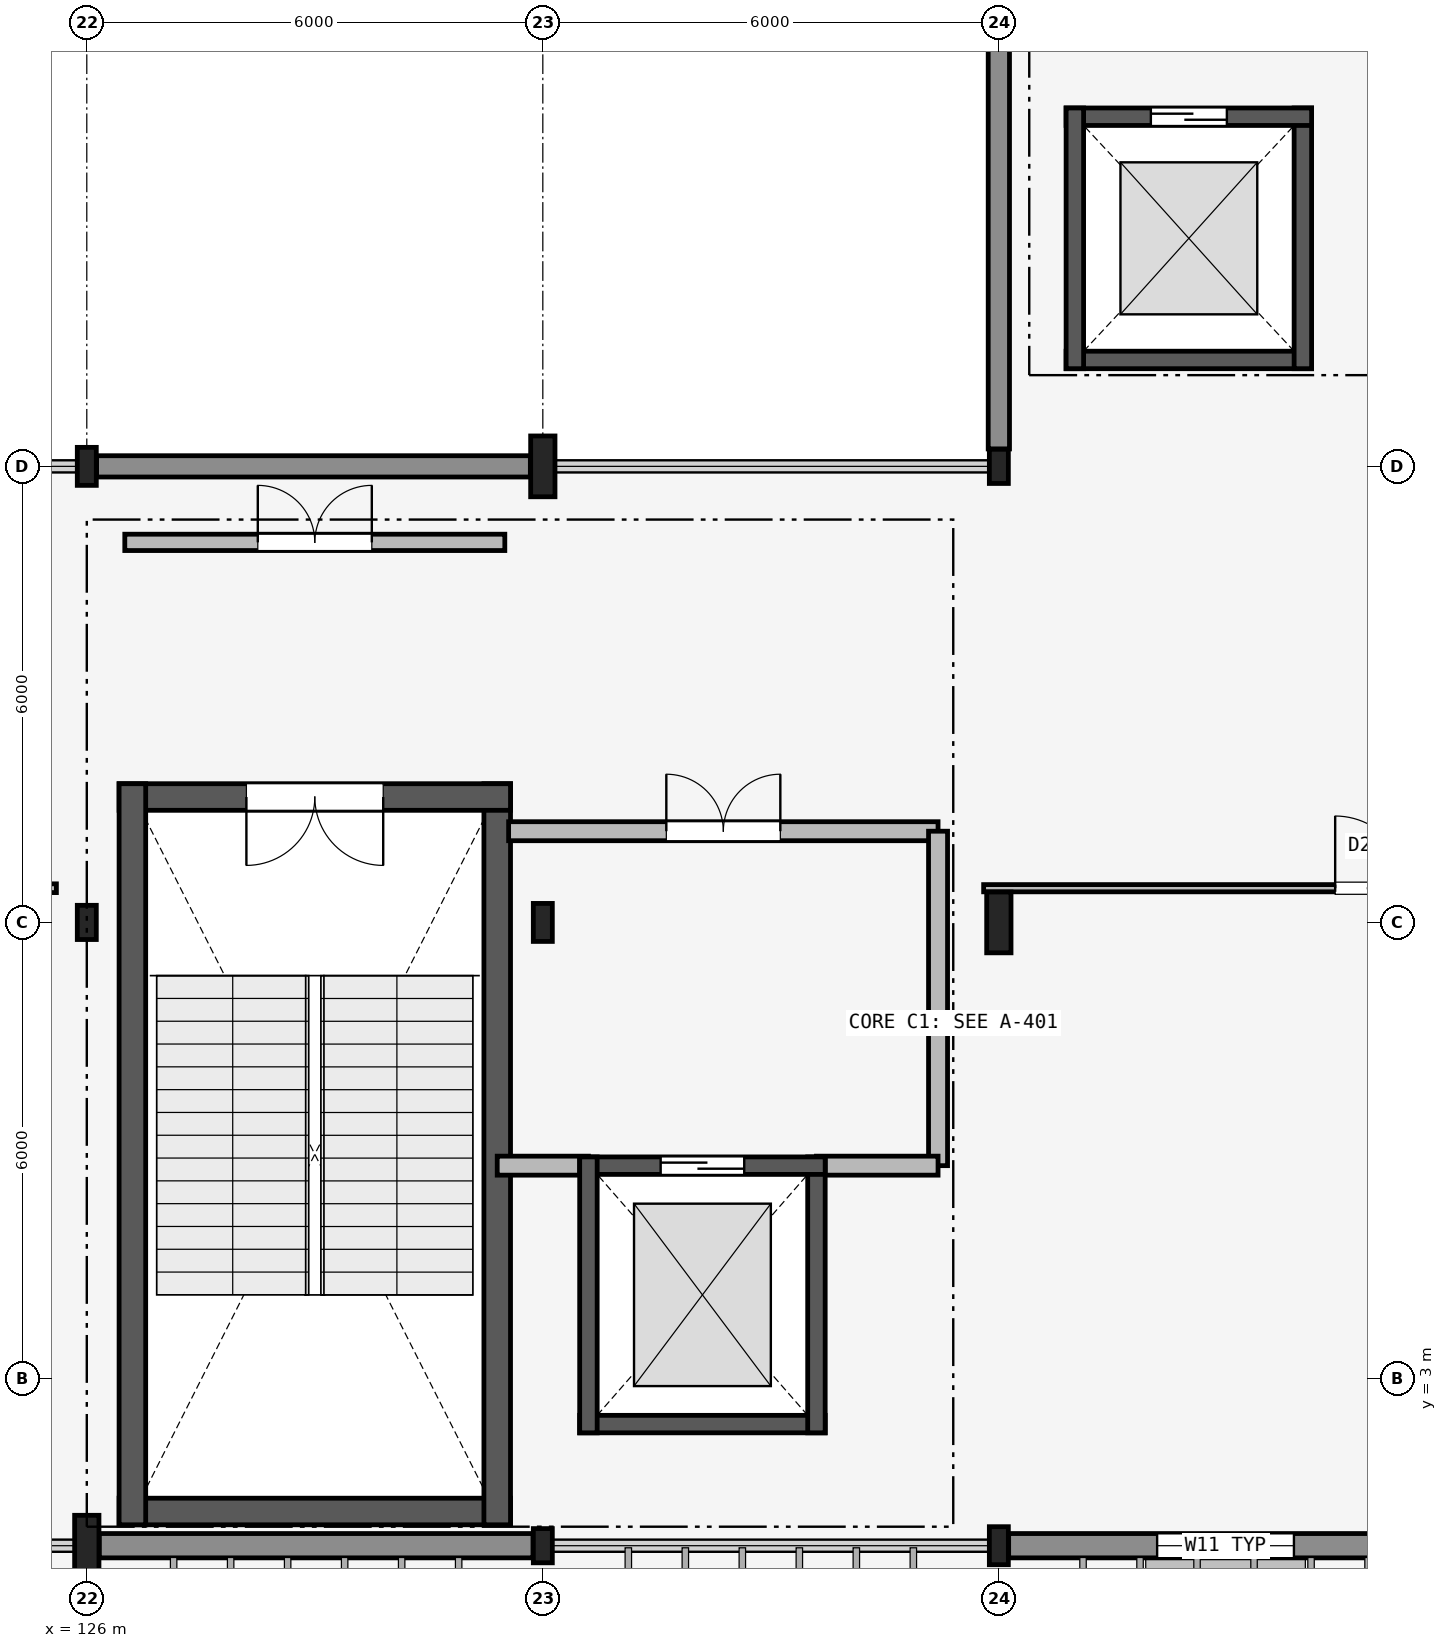
"""IFC4 building model, lengths in metres.
Left out: names, types, materials, properties, quantities, classifications, styles, units other than length and angle.
Written with IfcOpenShell. Run it as: python <this file> out.ifc"""

import sys

from ifc_helpers import new_model, si_unit, direction, frame, frame_2d, origin, origin_2d, place, context, subcontext, project, spatial, rectangle, i_section, extrude, element, fill, save


model = new_model("IFC4")
c1 = context("Model", 3, precision=1e-05, world=origin(), true_north=direction((0.0, 1.0)))
c2 = subcontext(c1, "Body", "Model", "MODEL_VIEW")
j1 = project(units=[si_unit("LENGTHUNIT", "METRE"), si_unit("PLANEANGLEUNIT", "RADIAN")], contexts=[c1])
p1 = place(None, origin())
s1 = spatial("IfcSite", under=j1, at=p1, CompositionType="ELEMENT")
p2 = place(p1, origin())
s2 = spatial("IfcBuilding", under=s1, at=p2, CompositionType="ELEMENT")
p3 = place(p2, frame((0.0, 0.0, 18.0)))
s3 = spatial("IfcBuildingStorey", under=s2, at=p3, CompositionType="ELEMENT", Elevation=18.0)
p4 = place(p3, frame((126.0, 0.8, 0.0), z_axis=(0.0, 0.0, 1.0), x_axis=(1.0, 0.0, 0.0)))
e1 = element("IfcColumn", 1, at=p4, inside=s3, PredefinedType="COLUMN", context=c2, shape_type="SweptSolid", body=[
    extrude(i_section(OverallWidth=0.32, OverallDepth=0.8, WebThickness=0.016, FlangeThickness=0.028, at=origin_2d()), origin(), (0.0, 0.0, 1.0), 4.2),
])
p5 = place(p3, frame((126.0, 9.0, 0.0), z_axis=(0.0, 0.0, 1.0), x_axis=(1.0, 0.0, 0.0)))
e2 = element("IfcColumn", 2, at=p5, inside=s3, PredefinedType="COLUMN", context=c2, shape_type="SweptSolid", body=[
    extrude(i_section(OverallWidth=0.25, OverallDepth=0.45, WebThickness=0.011, FlangeThickness=0.014, FilletRadius=0.015, at=origin_2d()), origin(), (0.0, 0.0, 1.0), 4.2),
])
p6 = place(p3, frame((126.0, 15.0, 0.0), z_axis=(0.0, 0.0, 1.0), x_axis=(1.0, 0.0, 0.0)))
e3 = element("IfcColumn", 3, at=p6, inside=s3, PredefinedType="COLUMN", context=c2, shape_type="SweptSolid", body=[
    extrude(i_section(OverallWidth=0.25, OverallDepth=0.5, WebThickness=0.01, FlangeThickness=0.015, FilletRadius=0.015, at=origin_2d()), origin(), (0.0, 0.0, 1.0), 4.2),
])
p7 = place(p3, frame((132.0, 0.8, 0.0), z_axis=(0.0, 0.0, 1.0), x_axis=(1.0, 0.0, 0.0)))
e4 = element("IfcColumn", 4, at=p7, inside=s3, PredefinedType="COLUMN", context=c2, shape_type="SweptSolid", body=[
    extrude(i_section(OverallWidth=0.25, OverallDepth=0.45, WebThickness=0.011, FlangeThickness=0.014, FilletRadius=0.015, at=origin_2d()), origin(), (0.0, 0.0, 1.0), 4.2),
])
p8 = place(p3, frame((132.0, 9.0, 0.0), z_axis=(0.0, 0.0, 1.0), x_axis=(1.0, 0.0, 0.0)))
e5 = element("IfcColumn", 5, at=p8, inside=s3, PredefinedType="COLUMN", context=c2, shape_type="SweptSolid", body=[
    extrude(i_section(OverallWidth=0.25, OverallDepth=0.5, WebThickness=0.01, FlangeThickness=0.015, FilletRadius=0.015, at=origin_2d()), origin(), (0.0, 0.0, 1.0), 4.2),
])
p9 = place(p3, frame((132.0, 15.0, 0.0), z_axis=(0.0, 0.0, 1.0), x_axis=(1.0, 0.0, 0.0)))
e6 = element("IfcColumn", 6, at=p9, inside=s3, PredefinedType="COLUMN", context=c2, shape_type="SweptSolid", body=[
    extrude(i_section(OverallWidth=0.32, OverallDepth=0.8, WebThickness=0.016, FlangeThickness=0.028, at=origin_2d()), origin(), (0.0, 0.0, 1.0), 4.2),
])
p10 = place(p3, frame((138.0, 0.8, 0.0), z_axis=(0.0, 0.0, 1.0), x_axis=(1.0, 0.0, 0.0)))
e7 = element("IfcColumn", 7, at=p10, inside=s3, PredefinedType="COLUMN", context=c2, shape_type="SweptSolid", body=[
    extrude(i_section(OverallWidth=0.25, OverallDepth=0.5, WebThickness=0.01, FlangeThickness=0.015, FilletRadius=0.015, at=origin_2d()), origin(), (0.0, 0.0, 1.0), 4.2),
])
p11 = place(p3, frame((138.0, 9.0, 0.0), z_axis=(0.0, 0.0, 1.0), x_axis=(1.0, 0.0, 0.0)))
e8 = element("IfcColumn", 8, at=p11, inside=s3, PredefinedType="COLUMN", context=c2, shape_type="SweptSolid", body=[
    extrude(i_section(OverallWidth=0.32, OverallDepth=0.8, WebThickness=0.016, FlangeThickness=0.028, at=origin_2d()), origin(), (0.0, 0.0, 1.0), 4.2),
])
p12 = place(p3, frame((138.0, 15.0, 0.0), z_axis=(0.0, 0.0, 1.0), x_axis=(1.0, 0.0, 0.0)))
e9 = element("IfcColumn", 9, at=p12, inside=s3, PredefinedType="COLUMN", context=c2, shape_type="SweptSolid", body=[
    extrude(i_section(OverallWidth=0.25, OverallDepth=0.45, WebThickness=0.011, FlangeThickness=0.014, FilletRadius=0.015, at=origin_2d()), origin(), (0.0, 0.0, 1.0), 4.2),
])
p13 = place(p3, frame((126.164, 0.8, 0.0), z_axis=(0.0, 0.0, 1.0), x_axis=(1.0, 0.0, 0.0)))
e10 = element("IfcWall", 10, at=p13, inside=s3, PredefinedType="SOLIDWALL", context=c2, shape_type="SweptSolid", body=[
    extrude(rectangle(XDim=5.707, YDim=0.32, at=frame_2d((2.854, 0.0))), origin(), (0.0, 0.0, 1.0), 3.39),
])
p14 = place(p3, frame((138.129, 0.8, 0.0), z_axis=(0.0, 0.0, 1.0), x_axis=(1.0, 0.0, 0.0)))
e11 = element("IfcWall", 11, at=p14, inside=s3, PredefinedType="SOLIDWALL", context=c2, shape_type="SweptSolid", body=[
    extrude(rectangle(XDim=5.707, YDim=0.32, at=frame_2d((2.854, 0.0))), origin(), (0.0, 0.0, 1.0), 3.39),
])
p15 = place(p14, frame((1.954, 0.0, 0.6)))
e12 = element("IfcOpeningElement", 12, at=p15, cuts=e11, PredefinedType="OPENING", context=c2, shape_type="SweptSolid", body=[
    extrude(rectangle(XDim=1.8, YDim=2.2, at=frame_2d((0.9, 1.1))), frame((0.0, 0.17, 0.0), z_axis=(0.0, -1.0, 0.0), x_axis=(1.0, 0.0, 0.0)), (0.0, 0.0, 1.0), 0.34),
])
p16 = place(p3, frame((126.129, 15.0, 0.0), z_axis=(0.0, 0.0, 1.0), x_axis=(1.0, 0.0, 0.0)))
e13 = element("IfcWall", 13, at=p16, inside=s3, PredefinedType="SOLIDWALL", context=c2, shape_type="SweptSolid", body=[
    extrude(rectangle(XDim=5.707, YDim=0.28, at=frame_2d((2.854, 0.0))), origin(), (0.0, 0.0, 1.0), 3.29),
])
p17 = place(p3, frame((138.0, 15.229, 0.0), z_axis=(0.0, 0.0, 1.0), x_axis=(0.0, 1.0, 0.0)))
e14 = element("IfcWall", 14, at=p17, inside=s3, PredefinedType="SOLIDWALL", context=c2, shape_type="SweptSolid", body=[
    extrude(rectangle(XDim=5.517, YDim=0.28, at=frame_2d((2.759, 0.0))), origin(), (0.0, 0.0, 1.0), 3.34),
])
p18 = place(p3, frame((126.425, 1.25, 0.0), z_axis=(0.0, 0.0, 1.0), x_axis=(1.0, 0.0, 0.0)))
e15 = element("IfcWall", 15, at=p18, inside=s3, PredefinedType="SHEAR", context=c2, shape_type="SweptSolid", body=[
    extrude(rectangle(XDim=5.15, YDim=0.35, at=frame_2d((2.575, 0.0))), origin(), (0.0, 0.0, 1.0), 4.06),
])
p19 = place(p3, frame((131.4, 1.075, 0.0), z_axis=(0.0, 0.0, 1.0), x_axis=(0.0, 1.0, 0.0)))
e16 = element("IfcWall", 16, at=p19, inside=s3, PredefinedType="SHEAR", context=c2, shape_type="SweptSolid", body=[
    extrude(rectangle(XDim=9.75, YDim=0.35, at=frame_2d((4.875, 0.0))), origin(), (0.0, 0.0, 1.0), 4.06),
])
p20 = place(p3, frame((131.575, 10.65, 0.0), z_axis=(0.0, 0.0, 1.0), x_axis=(-1.0, 0.0, 0.0)))
e17 = element("IfcWall", 17, at=p20, inside=s3, PredefinedType="SHEAR", context=c2, shape_type="SweptSolid", body=[
    extrude(rectangle(XDim=5.15, YDim=0.35, at=frame_2d((2.575, 0.0))), origin(), (0.0, 0.0, 1.0), 4.06),
])
p21 = place(p20, frame((1.675, 0.0, 0.0)))
e18 = element("IfcOpeningElement", 18, at=p21, cuts=e17, PredefinedType="OPENING", context=c2, shape_type="SweptSolid", body=[
    extrude(rectangle(XDim=1.8, YDim=2.2, at=frame_2d((0.9, 1.1))), frame((0.0, 0.185, 0.0), z_axis=(0.0, -1.0, 0.0), x_axis=(1.0, 0.0, 0.0)), (0.0, 0.0, 1.0), 0.37),
])
p22 = place(p3, frame((126.6, 10.825, 0.0), z_axis=(0.0, 0.0, 1.0), x_axis=(0.0, -1.0, 0.0)))
e19 = element("IfcWall", 19, at=p22, inside=s3, PredefinedType="SHEAR", context=c2, shape_type="SweptSolid", body=[
    extrude(rectangle(XDim=9.75, YDim=0.35, at=frame_2d((4.875, 0.0))), origin(), (0.0, 0.0, 1.0), 4.06),
])
p23 = place(p3, frame((126.5, 14.0, 0.0), z_axis=(0.0, 0.0, 1.0), x_axis=(1.0, 0.0, 0.0)))
e20 = element("IfcWall", 20, at=p23, inside=s3, PredefinedType="PARTITIONING", context=c2, shape_type="SweptSolid", body=[
    extrude(rectangle(XDim=5.0, YDim=0.215, at=frame_2d((2.5, 0.0))), origin(), (0.0, 0.0, 1.0), 3.89),
])
p24 = place(p23, frame((1.75, 0.0, 0.0)))
e21 = element("IfcOpeningElement", 21, at=p24, cuts=e20, PredefinedType="OPENING", context=c2, shape_type="SweptSolid", body=[
    extrude(rectangle(XDim=1.5, YDim=2.15, at=frame_2d((0.75, 1.075))), frame((0.0, 0.117, 0.0), z_axis=(0.0, -1.0, 0.0), x_axis=(1.0, 0.0, 0.0)), (0.0, 0.0, 1.0), 0.235),
])
p25 = place(p3, frame((131.55, 10.2, 0.0), z_axis=(0.0, 0.0, 1.0), x_axis=(1.0, 0.0, 0.0)))
e22 = element("IfcWall", 22, at=p25, inside=s3, PredefinedType="PARTITIONING", context=c2, shape_type="SweptSolid", body=[
    extrude(rectangle(XDim=5.65, YDim=0.25, at=frame_2d((2.825, 0.0))), origin(), (0.0, 0.0, 1.0), 3.44),
])
p26 = place(p25, frame((2.075, 0.0, 0.0)))
e23 = element("IfcOpeningElement", 23, at=p26, cuts=e22, PredefinedType="OPENING", context=c2, shape_type="SweptSolid", body=[
    extrude(rectangle(XDim=1.5, YDim=2.15, at=frame_2d((0.75, 1.075))), frame((0.0, 0.135, 0.0), z_axis=(0.0, -1.0, 0.0), x_axis=(1.0, 0.0, 0.0)), (0.0, 0.0, 1.0), 0.27),
])
p27 = place(p3, frame((137.2, 5.8, 0.0), z_axis=(0.0, 0.0, 1.0), x_axis=(0.0, 1.0, 0.0)))
e24 = element("IfcWall", 24, at=p27, inside=s3, PredefinedType="PARTITIONING", context=c2, shape_type="SweptSolid", body=[
    extrude(rectangle(XDim=4.4, YDim=0.25, at=frame_2d((2.2, 0.0))), origin(), (0.0, 0.0, 1.0), 3.34),
])
p28 = place(p3, frame((135.6, 5.8, 0.0), z_axis=(0.0, 0.0, 1.0), x_axis=(1.0, 0.0, 0.0)))
e25 = element("IfcWall", 25, at=p28, inside=s3, PredefinedType="PARTITIONING", context=c2, shape_type="SweptSolid", body=[
    extrude(rectangle(XDim=1.6, YDim=0.25, at=frame_2d((0.8, 0.0))), origin(), (0.0, 0.0, 1.0), 3.89),
])
p29 = place(p3, frame((131.4, 5.8, 0.0), z_axis=(0.0, 0.0, 1.0), x_axis=(1.0, 0.0, 0.0)))
e26 = element("IfcWall", 26, at=p29, inside=s3, PredefinedType="PARTITIONING", context=c2, shape_type="SweptSolid", body=[
    extrude(rectangle(XDim=1.2, YDim=0.25, at=frame_2d((0.6, 0.0))), origin(), (0.0, 0.0, 1.0), 3.39),
])
p30 = place(p3, frame((132.485, 2.4, 0.0), z_axis=(0.0, 0.0, 1.0), x_axis=(1.0, 0.0, 0.0)))
e27 = element("IfcWall", 27, at=p30, inside=s3, PredefinedType="SHEAR", context=c2, shape_type="SweptSolid", body=[
    extrude(rectangle(XDim=3.23, YDim=0.23, at=frame_2d((1.615, 0.0))), origin(), (0.0, 0.0, 1.0), 4.2),
])
p31 = place(p3, frame((135.6, 2.285, 0.0), z_axis=(0.0, 0.0, 1.0), x_axis=(0.0, 1.0, 0.0)))
e28 = element("IfcWall", 28, at=p31, inside=s3, PredefinedType="SHEAR", context=c2, shape_type="SweptSolid", body=[
    extrude(rectangle(XDim=3.63, YDim=0.23, at=frame_2d((1.815, 0.0))), origin(), (0.0, 0.0, 1.0), 4.2),
])
p32 = place(p3, frame((135.715, 5.8, 0.0), z_axis=(0.0, 0.0, 1.0), x_axis=(-1.0, 0.0, 0.0)))
e29 = element("IfcWall", 29, at=p32, inside=s3, PredefinedType="SHEAR", context=c2, shape_type="SweptSolid", body=[
    extrude(rectangle(XDim=3.23, YDim=0.23, at=frame_2d((1.615, 0.0))), origin(), (0.0, 0.0, 1.0), 4.2),
])
p33 = place(p32, frame((1.065, 0.0, 0.0)))
e30 = element("IfcOpeningElement", 30, at=p33, cuts=e29, PredefinedType="OPENING", context=c2, shape_type="SweptSolid", body=[
    extrude(rectangle(XDim=1.1, YDim=2.2, at=frame_2d((0.55, 1.1))), frame((0.0, 0.125, 0.0), z_axis=(0.0, -1.0, 0.0), x_axis=(1.0, 0.0, 0.0)), (0.0, 0.0, 1.0), 0.25),
])
p34 = place(p3, frame((132.6, 5.915, 0.0), z_axis=(0.0, 0.0, 1.0), x_axis=(0.0, -1.0, 0.0)))
e31 = element("IfcWall", 31, at=p34, inside=s3, PredefinedType="SHEAR", context=c2, shape_type="SweptSolid", body=[
    extrude(rectangle(XDim=3.63, YDim=0.23, at=frame_2d((1.815, 0.0))), origin(), (0.0, 0.0, 1.0), 4.2),
])
p35 = place(p3, frame((138.885, 16.4, 0.0), z_axis=(0.0, 0.0, 1.0), x_axis=(1.0, 0.0, 0.0)))
e32 = element("IfcWall", 32, at=p35, inside=s3, PredefinedType="SHEAR", context=c2, shape_type="SweptSolid", body=[
    extrude(rectangle(XDim=3.23, YDim=0.23, at=frame_2d((1.615, 0.0))), origin(), (0.0, 0.0, 1.0), 4.2),
])
p36 = place(p3, frame((142.0, 16.285, 0.0), z_axis=(0.0, 0.0, 1.0), x_axis=(0.0, 1.0, 0.0)))
e33 = element("IfcWall", 33, at=p36, inside=s3, PredefinedType="SHEAR", context=c2, shape_type="SweptSolid", body=[
    extrude(rectangle(XDim=3.43, YDim=0.23, at=frame_2d((1.715, 0.0))), origin(), (0.0, 0.0, 1.0), 4.2),
])
p37 = place(p3, frame((142.115, 19.6, 0.0), z_axis=(0.0, 0.0, 1.0), x_axis=(-1.0, 0.0, 0.0)))
e34 = element("IfcWall", 34, at=p37, inside=s3, PredefinedType="SHEAR", context=c2, shape_type="SweptSolid", body=[
    extrude(rectangle(XDim=3.23, YDim=0.23, at=frame_2d((1.615, 0.0))), origin(), (0.0, 0.0, 1.0), 4.2),
])
p38 = place(p37, frame((1.115, 0.0, 0.0)))
e35 = element("IfcOpeningElement", 35, at=p38, cuts=e34, PredefinedType="OPENING", context=c2, shape_type="SweptSolid", body=[
    extrude(rectangle(XDim=1.0, YDim=2.15, at=frame_2d((0.5, 1.075))), frame((0.0, 0.125, 0.0), z_axis=(0.0, -1.0, 0.0), x_axis=(1.0, 0.0, 0.0)), (0.0, 0.0, 1.0), 0.25),
])
p39 = place(p3, frame((139.0, 19.715, 0.0), z_axis=(0.0, 0.0, 1.0), x_axis=(0.0, -1.0, 0.0)))
e36 = element("IfcWall", 36, at=p39, inside=s3, PredefinedType="SHEAR", context=c2, shape_type="SweptSolid", body=[
    extrude(rectangle(XDim=3.43, YDim=0.23, at=frame_2d((1.715, 0.0))), origin(), (0.0, 0.0, 1.0), 4.2),
])
p40 = place(p3, frame((108.5, 9.45, 0.0), z_axis=(0.0, 0.0, 1.0), x_axis=(1.0, 0.0, 0.0)))
e37 = element("IfcWall", 37, at=p40, inside=s3, PredefinedType="PARTITIONING", context=c2, shape_type="SweptSolid", body=[
    extrude(rectangle(XDim=17.1, YDim=0.115, at=frame_2d((8.55, 0.0))), origin(), (0.0, 0.0, 1.0), 3.44),
])
p41 = place(p40, frame((8.05, 0.0, 0.0)))
e38 = element("IfcOpeningElement", 38, at=p41, cuts=e37, PredefinedType="OPENING", context=c2, shape_type="SweptSolid", body=[
    extrude(rectangle(XDim=1.0, YDim=2.15, at=frame_2d((0.5, 1.075))), frame((0.0, 0.067, 0.0), z_axis=(0.0, -1.0, 0.0), x_axis=(1.0, 0.0, 0.0)), (0.0, 0.0, 1.0), 0.135),
])
p42 = place(p3, frame((137.8, 9.45, 0.0), z_axis=(0.0, 0.0, 1.0), x_axis=(1.0, 0.0, 0.0)))
e39 = element("IfcWall", 39, at=p42, inside=s3, PredefinedType="PARTITIONING", context=c2, shape_type="SweptSolid", body=[
    extrude(rectangle(XDim=12.0, YDim=0.095, at=frame_2d((6.0, 0.0))), origin(), (0.0, 0.0, 1.0), 3.44),
])
p43 = place(p42, frame((4.625, 0.0, 0.0)))
e40 = element("IfcOpeningElement", 40, at=p43, cuts=e39, PredefinedType="OPENING", context=c2, shape_type="SweptSolid", body=[
    extrude(rectangle(XDim=0.95, YDim=2.15, at=frame_2d((0.475, 1.075))), frame((0.0, 0.057, 0.0), z_axis=(0.0, -1.0, 0.0), x_axis=(1.0, 0.0, 0.0)), (0.0, 0.0, 1.0), 0.115),
])
p44 = place(p15, origin())
e41 = element("IfcWindow", 41, at=p44, inside=s3, PartitioningType="SINGLE_PANEL", PredefinedType="WINDOW", context=c2, shape_type="SweptSolid", body=[
    extrude(rectangle(XDim=1.8, YDim=2.2, at=frame_2d((0.9, 1.1))), frame((0.0, 0.03, 0.0), z_axis=(0.0, -1.0, 0.0), x_axis=(1.0, 0.0, 0.0)), (0.0, 0.0, 1.0), 0.06),
])
fill(e12, e41)
p45 = place(p21, origin())
e42 = element("IfcDoor", 42, at=p45, inside=s3, OperationType="DOUBLE_DOOR_SINGLE_SWING", PredefinedType="DOOR", context=c2, shape_type="SweptSolid", body=[
    extrude(rectangle(XDim=1.8, YDim=2.2, at=frame_2d((0.9, 1.1))), frame((0.0, 0.025, 0.0), z_axis=(0.0, -1.0, 0.0), x_axis=(1.0, 0.0, 0.0)), (0.0, 0.0, 1.0), 0.05),
])
fill(e18, e42)
p46 = place(p24, origin())
e43 = element("IfcDoor", 43, at=p46, inside=s3, OperationType="DOUBLE_DOOR_SINGLE_SWING", PredefinedType="DOOR", context=c2, shape_type="SweptSolid", body=[
    extrude(rectangle(XDim=1.5, YDim=2.15, at=frame_2d((0.75, 1.075))), frame((0.0, 0.025, 0.0), z_axis=(0.0, -1.0, 0.0), x_axis=(1.0, 0.0, 0.0)), (0.0, 0.0, 1.0), 0.05),
])
fill(e21, e43)
p47 = place(p26, origin())
e44 = element("IfcDoor", 44, at=p47, inside=s3, OperationType="DOUBLE_DOOR_SINGLE_SWING", PredefinedType="DOOR", context=c2, shape_type="SweptSolid", body=[
    extrude(rectangle(XDim=1.5, YDim=2.15, at=frame_2d((0.75, 1.075))), frame((0.0, 0.025, 0.0), z_axis=(0.0, -1.0, 0.0), x_axis=(1.0, 0.0, 0.0)), (0.0, 0.0, 1.0), 0.05),
])
fill(e23, e44)
p48 = place(p33, origin())
e45 = element("IfcDoor", 45, at=p48, inside=s3, OperationType="SLIDING_TO_LEFT", PredefinedType="DOOR", context=c2, shape_type="SweptSolid", body=[
    extrude(rectangle(XDim=1.1, YDim=2.2, at=frame_2d((0.55, 1.1))), frame((0.0, 0.025, 0.0), z_axis=(0.0, -1.0, 0.0), x_axis=(1.0, 0.0, 0.0)), (0.0, 0.0, 1.0), 0.05),
])
fill(e30, e45)
p49 = place(p38, origin())
e46 = element("IfcDoor", 46, at=p49, inside=s3, OperationType="SLIDING_TO_LEFT", PredefinedType="DOOR", context=c2, shape_type="SweptSolid", body=[
    extrude(rectangle(XDim=1.0, YDim=2.15, at=frame_2d((0.5, 1.075))), frame((0.0, 0.025, 0.0), z_axis=(0.0, -1.0, 0.0), x_axis=(1.0, 0.0, 0.0)), (0.0, 0.0, 1.0), 0.05),
])
fill(e35, e46)
p50 = place(p43, origin())
e47 = element("IfcDoor", 47, at=p50, inside=s3, OperationType="SINGLE_SWING_LEFT", PredefinedType="DOOR", context=c2, shape_type="SweptSolid", body=[
    extrude(rectangle(XDim=0.95, YDim=2.15, at=frame_2d((0.475, 1.075))), frame((0.0, 0.025, 0.0), z_axis=(0.0, -1.0, 0.0), x_axis=(1.0, 0.0, 0.0)), (0.0, 0.0, 1.0), 0.05),
])
fill(e40, e47)
save(model, sys.argv[1])
